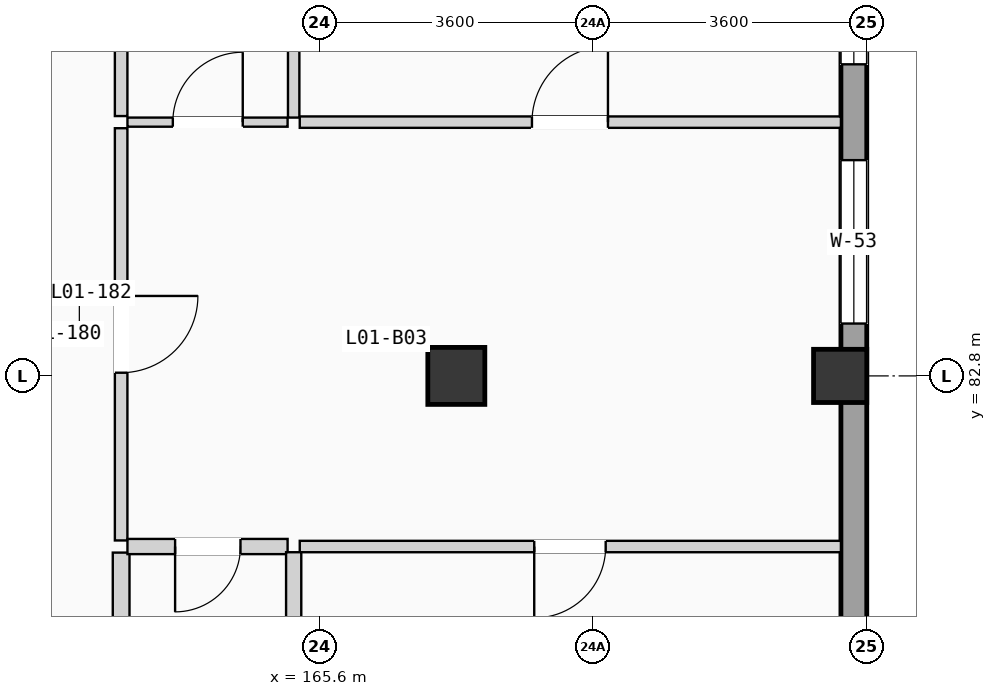
"""IFC4 building model, lengths in metres.
Left out: names, types, materials, properties, quantities, classifications, styles, units other than length and angle.
Written with IfcOpenShell. Run it as: python <this file> out.ifc"""

import sys

from ifc_helpers import new_model, si_unit, direction, frame, frame_2d, origin, origin_2d, place, context, subcontext, project, spatial, rectangle, extrude, element, fill, save


model = new_model("IFC4")
c1 = context("Model", 3, precision=1e-05, world=origin(), true_north=direction((0.0, 1.0)))
c2 = subcontext(c1, "Body", "Model", "MODEL_VIEW")
j1 = project(units=[si_unit("LENGTHUNIT", "METRE"), si_unit("PLANEANGLEUNIT", "RADIAN")], contexts=[c1])
p1 = place(None, origin())
s1 = spatial("IfcSite", under=j1, at=p1, CompositionType="ELEMENT")
p2 = place(p1, origin())
s2 = spatial("IfcBuilding", under=s1, at=p2, CompositionType="ELEMENT")
p3 = place(p2, frame((0.0, 0.0, 4.9)))
s3 = spatial("IfcBuildingStorey", under=s2, at=p3, CompositionType="ELEMENT", Elevation=4.9)
p4 = place(p3, frame((167.4, 82.8, 0.0), z_axis=(0.0, 0.0, 1.0), x_axis=(1.0, 0.0, 0.0)))
e1 = element("IfcColumn", 1, at=p4, inside=s3, PredefinedType="COLUMN", context=c2, shape_type="SweptSolid", body=[
    extrude(rectangle(XDim=0.75, YDim=0.75, at=origin_2d()), origin(), (0.0, 0.0, 1.0), 3.675),
])
p5 = place(p3, frame((172.45, 82.8, 0.0), z_axis=(0.0, 0.0, 1.0), x_axis=(1.0, 0.0, 0.0)))
e2 = element("IfcColumn", 2, at=p5, inside=s3, PredefinedType="COLUMN", context=c2, shape_type="SweptSolid", body=[
    extrude(rectangle(XDim=0.7, YDim=0.7, at=origin_2d()), origin(), (0.0, 0.0, 1.0), 3.675),
])
p6 = place(p3, frame((172.63, 68.74, 0.0), z_axis=(0.0, 0.0, 1.0), x_axis=(0.0, 1.0, 0.0)))
e3 = element("IfcWall", 3, at=p6, inside=s3, PredefinedType="SOLIDWALL", context=c2, shape_type="SweptSolid", body=[
    extrude(rectangle(XDim=49.72, YDim=0.34, at=frame_2d((24.86, 0.0))), origin(), (0.0, 0.0, 1.0), 3.415),
])
p7 = place(p6, frame((14.749, 0.0, 0.9)))
e4 = element("IfcOpeningElement", 4, at=p7, cuts=e3, PredefinedType="OPENING", context=c2, shape_type="SweptSolid", body=[
    extrude(rectangle(XDim=2.15, YDim=1.5, at=frame_2d((1.075, 0.75))), frame((0.0, 0.18, 0.0), z_axis=(0.0, -1.0, 0.0), x_axis=(1.0, 0.0, 0.0)), (0.0, 0.0, 1.0), 0.36),
])
p8 = place(p6, frame((8.422, 0.0, 0.9)))
e5 = element("IfcOpeningElement", 5, at=p8, cuts=e3, PredefinedType="OPENING", context=c2, shape_type="SweptSolid", body=[
    extrude(rectangle(XDim=2.15, YDim=1.65, at=frame_2d((1.075, 0.825))), frame((0.0, 0.18, 0.0), z_axis=(0.0, -1.0, 0.0), x_axis=(1.0, 0.0, 0.0)), (0.0, 0.0, 1.0), 0.36),
])
p9 = place(p6, frame((18.16, 0.0, 0.9)))
e6 = element("IfcOpeningElement", 6, at=p9, cuts=e3, PredefinedType="OPENING", context=c2, shape_type="SweptSolid", body=[
    extrude(rectangle(XDim=2.15, YDim=1.8, at=frame_2d((1.075, 0.9))), frame((0.0, 0.18, 0.0), z_axis=(0.0, -1.0, 0.0), x_axis=(1.0, 0.0, 0.0)), (0.0, 0.0, 1.0), 0.36),
])
p10 = place(p6, frame((30.91, 0.0, 0.9)))
e7 = element("IfcOpeningElement", 7, at=p10, cuts=e3, PredefinedType="OPENING", context=c2, shape_type="SweptSolid", body=[
    extrude(rectangle(XDim=2.3, YDim=1.2, at=frame_2d((1.15, 0.6))), frame((0.0, 0.18, 0.0), z_axis=(0.0, -1.0, 0.0), x_axis=(1.0, 0.0, 0.0)), (0.0, 0.0, 1.0), 0.36),
])
p11 = place(p6, frame((24.012, 0.0, 0.9)))
e8 = element("IfcOpeningElement", 8, at=p11, cuts=e3, PredefinedType="OPENING", context=c2, shape_type="SweptSolid", body=[
    extrude(rectangle(XDim=2.3, YDim=1.35, at=frame_2d((1.15, 0.675))), frame((0.0, 0.18, 0.0), z_axis=(0.0, -1.0, 0.0), x_axis=(1.0, 0.0, 0.0)), (0.0, 0.0, 1.0), 0.36),
])
p12 = place(p6, frame((38.045, 0.0, 0.9)))
e9 = element("IfcOpeningElement", 9, at=p12, cuts=e3, PredefinedType="OPENING", context=c2, shape_type="SweptSolid", body=[
    extrude(rectangle(XDim=2.3, YDim=1.5, at=frame_2d((1.15, 0.75))), frame((0.0, 0.18, 0.0), z_axis=(0.0, -1.0, 0.0), x_axis=(1.0, 0.0, 0.0)), (0.0, 0.0, 1.0), 0.36),
])
p13 = place(p3, frame((162.99, 80.635, 0.0), z_axis=(0.0, 0.0, 1.0), x_axis=(0.0, 1.0, 0.0)))
e10 = element("IfcWall", 10, at=p13, inside=s3, PredefinedType="PARTITIONING", context=c2, shape_type="SweptSolid", body=[
    extrude(rectangle(XDim=5.424, YDim=0.165, at=frame_2d((2.712, 0.0))), origin(), (0.0, 0.0, 1.0), 3.395),
])
p14 = place(p13, frame((2.207, 0.0, 0.0)))
e11 = element("IfcOpeningElement", 11, at=p14, cuts=e10, PredefinedType="OPENING", context=c2, shape_type="SweptSolid", body=[
    extrude(rectangle(XDim=1.01, YDim=2.11, at=frame_2d((0.505, 1.055))), frame((0.0, 0.093, 0.0), z_axis=(0.0, -1.0, 0.0), x_axis=(1.0, 0.0, 0.0)), (0.0, 0.0, 1.0), 0.185),
])
p15 = place(p3, frame((162.99, 75.975, 0.0), z_axis=(0.0, 0.0, 1.0), x_axis=(0.0, 1.0, 0.0)))
e12 = element("IfcWall", 12, at=p15, inside=s3, PredefinedType="PLUMBINGWALL", context=c2, shape_type="SweptSolid", body=[
    extrude(rectangle(XDim=4.5, YDim=0.22, at=frame_2d((2.25, 0.0))), origin(), (0.0, 0.0, 1.0), 3.395),
])
p16 = place(p3, frame((162.99, 86.219, 0.0), z_axis=(0.0, 0.0, 1.0), x_axis=(0.0, 1.0, 0.0)))
e13 = element("IfcWall", 13, at=p16, inside=s3, PredefinedType="PARTITIONING", context=c2, shape_type="SweptSolid", body=[
    extrude(rectangle(XDim=4.475, YDim=0.165, at=frame_2d((2.238, 0.0))), origin(), (0.0, 0.0, 1.0), 3.395),
])
p17 = place(p3, frame((163.073, 80.555, 0.0), z_axis=(0.0, 0.0, 1.0), x_axis=(1.0, 0.0, 0.0)))
e14 = element("IfcWall", 14, at=p17, inside=s3, PredefinedType="PLUMBINGWALL", context=c2, shape_type="SweptSolid", body=[
    extrude(rectangle(XDim=2.107, YDim=0.2, at=frame_2d((1.053, 0.0))), origin(), (0.0, 0.0, 1.0), 3.395),
])
p18 = place(p17, frame((0.627, 0.0, 0.0)))
e15 = element("IfcOpeningElement", 15, at=p18, cuts=e14, PredefinedType="OPENING", context=c2, shape_type="SweptSolid", body=[
    extrude(rectangle(XDim=0.86, YDim=2.0, at=frame_2d((0.43, 1.0))), frame((0.0, 0.11, 0.0), z_axis=(0.0, -1.0, 0.0), x_axis=(1.0, 0.0, 0.0)), (0.0, 0.0, 1.0), 0.22),
])
p19 = place(p3, frame((163.073, 86.139, 0.0), z_axis=(0.0, 0.0, 1.0), x_axis=(1.0, 0.0, 0.0)))
e16 = element("IfcWall", 16, at=p19, inside=s3, PredefinedType="PARTITIONING", context=c2, shape_type="SweptSolid", body=[
    extrude(rectangle(XDim=2.107, YDim=0.12, at=frame_2d((1.053, 0.0))), origin(), (0.0, 0.0, 1.0), 3.395),
])
p20 = place(p19, frame((0.597, 0.0, 0.0)))
e17 = element("IfcOpeningElement", 17, at=p20, cuts=e16, PredefinedType="OPENING", context=c2, shape_type="SweptSolid", body=[
    extrude(rectangle(XDim=0.92, YDim=2.02, at=frame_2d((0.46, 1.01))), frame((0.0, 0.07, 0.0), z_axis=(0.0, -1.0, 0.0), x_axis=(1.0, 0.0, 0.0)), (0.0, 0.0, 1.0), 0.14),
])
p21 = place(p3, frame((165.34, 80.555, 0.0), z_axis=(0.0, 0.0, 1.0), x_axis=(1.0, 0.0, 0.0)))
e18 = element("IfcWall", 18, at=p21, inside=s3, PredefinedType="PARTITIONING", context=c2, shape_type="SweptSolid", body=[
    extrude(rectangle(XDim=7.12, YDim=0.15, at=frame_2d((3.56, 0.0))), origin(), (0.0, 0.0, 1.0), 3.395),
])
p22 = place(p21, frame((3.085, 0.0, 0.0)))
e19 = element("IfcOpeningElement", 19, at=p22, cuts=e18, PredefinedType="OPENING", context=c2, shape_type="SweptSolid", body=[
    extrude(rectangle(XDim=0.94, YDim=2.06, at=frame_2d((0.47, 1.03))), frame((0.0, 0.085, 0.0), z_axis=(0.0, -1.0, 0.0), x_axis=(1.0, 0.0, 0.0)), (0.0, 0.0, 1.0), 0.17),
])
p23 = place(p3, frame((165.34, 86.139, 0.0), z_axis=(0.0, 0.0, 1.0), x_axis=(1.0, 0.0, 0.0)))
e20 = element("IfcWall", 20, at=p23, inside=s3, PredefinedType="PARTITIONING", context=c2, shape_type="SweptSolid", body=[
    extrude(rectangle(XDim=7.12, YDim=0.15, at=frame_2d((3.56, 0.0))), origin(), (0.0, 0.0, 1.0), 3.395),
])
p24 = place(p23, frame((3.055, 0.0, 0.0)))
e21 = element("IfcOpeningElement", 21, at=p24, cuts=e20, PredefinedType="OPENING", context=c2, shape_type="SweptSolid", body=[
    extrude(rectangle(XDim=1.0, YDim=2.06, at=frame_2d((0.5, 1.03))), frame((0.0, 0.085, 0.0), z_axis=(0.0, -1.0, 0.0), x_axis=(1.0, 0.0, 0.0)), (0.0, 0.0, 1.0), 0.17),
])
p25 = place(p3, frame((165.26, 75.975, 0.0), z_axis=(0.0, 0.0, 1.0), x_axis=(0.0, 1.0, 0.0)))
e22 = element("IfcWall", 22, at=p25, inside=s3, PredefinedType="PLUMBINGWALL", context=c2, shape_type="SweptSolid", body=[
    extrude(rectangle(XDim=4.505, YDim=0.2, at=frame_2d((2.252, 0.0))), origin(), (0.0, 0.0, 1.0), 3.395),
])
p26 = place(p3, frame((165.26, 86.199, 0.0), z_axis=(0.0, 0.0, 1.0), x_axis=(0.0, 1.0, 0.0)))
e23 = element("IfcWall", 23, at=p26, inside=s3, PredefinedType="PARTITIONING", context=c2, shape_type="SweptSolid", body=[
    extrude(rectangle(XDim=4.495, YDim=0.15, at=frame_2d((2.248, 0.0))), origin(), (0.0, 0.0, 1.0), 3.395),
])
p27 = place(p7, origin())
e24 = element("IfcWindow", 24, at=p27, inside=s3, PartitioningType="DOUBLE_PANEL_VERTICAL", PredefinedType="WINDOW", context=c2, shape_type="SweptSolid", body=[
    extrude(rectangle(XDim=2.15, YDim=1.5, at=frame_2d((1.075, 0.75))), frame((0.0, 0.03, 0.0), z_axis=(0.0, -1.0, 0.0), x_axis=(1.0, 0.0, 0.0)), (0.0, 0.0, 1.0), 0.06),
])
fill(e4, e24)
p28 = place(p9, origin())
e25 = element("IfcWindow", 25, at=p28, inside=s3, PartitioningType="DOUBLE_PANEL_VERTICAL", PredefinedType="WINDOW", context=c2, shape_type="SweptSolid", body=[
    extrude(rectangle(XDim=2.15, YDim=1.8, at=frame_2d((1.075, 0.9))), frame((0.0, 0.03, 0.0), z_axis=(0.0, -1.0, 0.0), x_axis=(1.0, 0.0, 0.0)), (0.0, 0.0, 1.0), 0.06),
])
fill(e6, e25)
p29 = place(p14, frame((1.01, 0.0, 0.0), z_axis=(0.0, 0.0, 1.0), x_axis=(-1.0, 0.0, 0.0)))
e26 = element("IfcDoor", 26, at=p29, inside=s3, OperationType="SINGLE_SWING_RIGHT", PredefinedType="DOOR", context=c2, shape_type="SweptSolid", body=[
    extrude(rectangle(XDim=1.01, YDim=2.11, at=frame_2d((0.505, 1.055))), frame((0.0, 0.025, 0.0), z_axis=(0.0, -1.0, 0.0), x_axis=(1.0, 0.0, 0.0)), (0.0, 0.0, 1.0), 0.05),
])
fill(e11, e26)
p30 = place(p18, frame((0.86, 0.0, 0.0), z_axis=(0.0, 0.0, 1.0), x_axis=(-1.0, 0.0, 0.0)))
e27 = element("IfcDoor", 27, at=p30, inside=s3, OperationType="SINGLE_SWING_LEFT", PredefinedType="DOOR", context=c2, shape_type="SweptSolid", body=[
    extrude(rectangle(XDim=0.86, YDim=2.0, at=frame_2d((0.43, 1.0))), frame((0.0, 0.025, 0.0), z_axis=(0.0, -1.0, 0.0), x_axis=(1.0, 0.0, 0.0)), (0.0, 0.0, 1.0), 0.05),
])
fill(e15, e27)
p31 = place(p20, origin())
e28 = element("IfcDoor", 28, at=p31, inside=s3, OperationType="SINGLE_SWING_RIGHT", PredefinedType="DOOR", context=c2, shape_type="SweptSolid", body=[
    extrude(rectangle(XDim=0.92, YDim=2.02, at=frame_2d((0.46, 1.01))), frame((0.0, 0.025, 0.0), z_axis=(0.0, -1.0, 0.0), x_axis=(1.0, 0.0, 0.0)), (0.0, 0.0, 1.0), 0.05),
])
fill(e17, e28)
p32 = place(p22, frame((0.94, 0.0, 0.0), z_axis=(0.0, 0.0, 1.0), x_axis=(-1.0, 0.0, 0.0)))
e29 = element("IfcDoor", 29, at=p32, inside=s3, OperationType="SINGLE_SWING_LEFT", PredefinedType="DOOR", context=c2, shape_type="SweptSolid", body=[
    extrude(rectangle(XDim=0.94, YDim=2.06, at=frame_2d((0.47, 1.03))), frame((0.0, 0.025, 0.0), z_axis=(0.0, -1.0, 0.0), x_axis=(1.0, 0.0, 0.0)), (0.0, 0.0, 1.0), 0.05),
])
fill(e19, e29)
p33 = place(p24, origin())
e30 = element("IfcDoor", 30, at=p33, inside=s3, OperationType="SINGLE_SWING_RIGHT", PredefinedType="DOOR", context=c2, shape_type="SweptSolid", body=[
    extrude(rectangle(XDim=1.0, YDim=2.06, at=frame_2d((0.5, 1.03))), frame((0.0, 0.025, 0.0), z_axis=(0.0, -1.0, 0.0), x_axis=(1.0, 0.0, 0.0)), (0.0, 0.0, 1.0), 0.05),
])
fill(e21, e30)
save(model, sys.argv[1])
